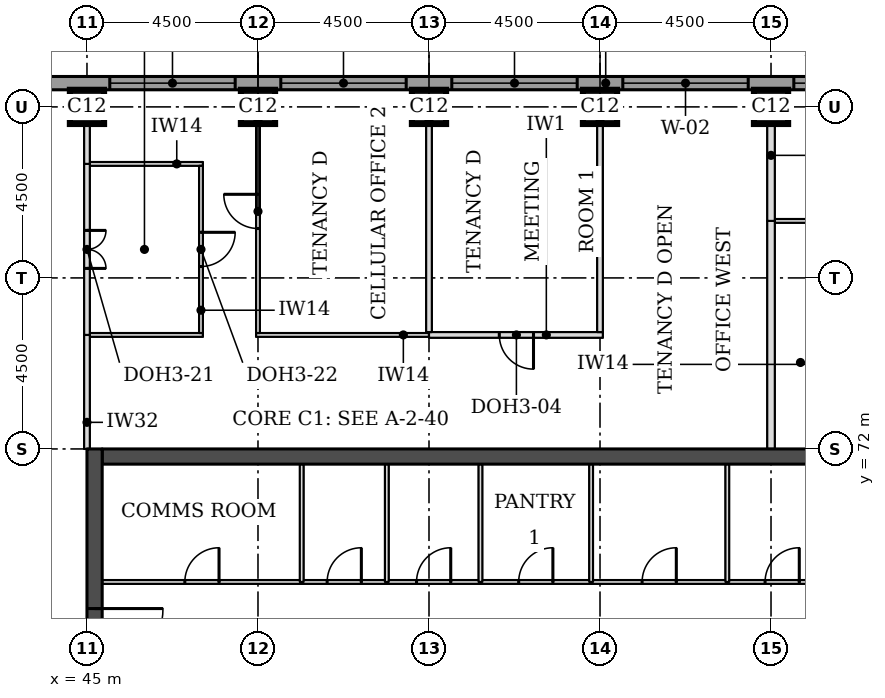
"""IFC4 building model, lengths in metres.
Left out: names, types, materials, properties, quantities, classifications, styles, units other than length and angle.
Written with IfcOpenShell. Run it as: python <this file> out.ifc"""

import sys

from ifc_helpers import new_model, si_unit, direction, frame, frame_2d, origin, origin_2d, place, context, subcontext, project, spatial, rectangle, extrude, element, fill, save


model = new_model("IFC4")
c1 = context("Model", 3, precision=1e-05, world=origin(), true_north=direction((0.0, 1.0)))
c2 = subcontext(c1, "Body", "Model", "MODEL_VIEW")
j1 = project(units=[si_unit("LENGTHUNIT", "METRE"), si_unit("PLANEANGLEUNIT", "RADIAN")], contexts=[c1])
p1 = place(None, origin())
s1 = spatial("IfcSite", under=j1, at=p1, CompositionType="ELEMENT")
p2 = place(p1, origin())
s2 = spatial("IfcBuilding", under=s1, at=p2, CompositionType="ELEMENT")
p3 = place(p2, frame((0.0, 0.0, 162.5)))
s3 = spatial("IfcBuildingStorey", under=s2, at=p3, CompositionType="ELEMENT", Elevation=162.5)
for number, where, z_axis, x_axis in (
    (1, (45.0, 81.0, 0.0), (0.0, 0.0, 1.0), (1.0, 0.0, 0.0)),
    (2, (49.5, 81.0, 0.0), (0.0, 0.0, 1.0), (1.0, 0.0, 0.0)),
    (3, (54.0, 81.0, 0.0), (0.0, 0.0, 1.0), (1.0, 0.0, 0.0)),
    (4, (58.5, 81.0, 0.0), (0.0, 0.0, 1.0), (1.0, 0.0, 0.0)),
    (5, (63.0, 81.0, 0.0), (0.0, 0.0, 1.0), (1.0, 0.0, 0.0)),
):
    element("IfcColumn", number, at=place(p3, frame(where, z_axis=z_axis, x_axis=x_axis)), inside=s3, PredefinedType="COLUMN", context=c2, shape_type="SweptSolid", body=[
        extrude(rectangle(XDim=0.9, YDim=0.9, at=origin_2d()), origin(), (0.0, 0.0, 1.0), 3.7),
    ])
p4 = place(p3, frame((45.4, 71.8, 0.0), z_axis=(0.0, 0.0, 1.0), x_axis=(1.0, 0.0, 0.0)))
e6 = element("IfcWall", 6, at=p4, inside=s3, PredefinedType="SHEAR", context=c2, shape_type="SweptSolid", body=[
    extrude(rectangle(XDim=21.7, YDim=0.4, at=frame_2d((10.85, 0.0))), origin(), (0.0, 0.0, 1.0), 3.7),
])
p5 = place(p3, frame((45.2, 49.5, 0.0), z_axis=(0.0, 0.0, 1.0), x_axis=(0.0, 1.0, 0.0)))
e7 = element("IfcWall", 7, at=p5, inside=s3, PredefinedType="SHEAR", context=c2, shape_type="SweptSolid", body=[
    extrude(rectangle(XDim=22.5, YDim=0.4, at=frame_2d((11.25, 0.0))), origin(), (0.0, 0.0, 1.0), 3.7),
])
p6 = place(p5, frame((4.2, 0.0, 0.0)))
e8 = element("IfcOpeningElement", 8, at=p6, cuts=e7, PredefinedType="OPENING", context=c2, shape_type="SweptSolid", body=[
    extrude(rectangle(XDim=1.8, YDim=2.1, at=frame_2d((0.9, 1.05))), frame((0.0, 0.21, 0.0), z_axis=(0.0, -1.0, 0.0), x_axis=(1.0, 0.0, 0.0)), (0.0, 0.0, 1.0), 0.42),
])
p7 = place(p5, frame((6.9, 0.0, 0.0)))
e9 = element("IfcOpeningElement", 9, at=p7, cuts=e7, PredefinedType="OPENING", context=c2, shape_type="SweptSolid", body=[
    extrude(rectangle(XDim=1.1, YDim=2.1, at=frame_2d((0.55, 1.05))), frame((0.0, 0.21, 0.0), z_axis=(0.0, -1.0, 0.0), x_axis=(1.0, 0.0, 0.0)), (0.0, 0.0, 1.0), 0.42),
])
p8 = place(p5, frame((13.6, 0.0, 0.0)))
e10 = element("IfcOpeningElement", 10, at=p8, cuts=e7, PredefinedType="OPENING", context=c2, shape_type="SweptSolid", body=[
    extrude(rectangle(XDim=1.1, YDim=2.1, at=frame_2d((0.55, 1.05))), frame((0.0, 0.21, 0.0), z_axis=(0.0, -1.0, 0.0), x_axis=(1.0, 0.0, 0.0)), (0.0, 0.0, 1.0), 0.42),
])
p9 = place(p5, frame((16.5, 0.0, 0.0)))
e11 = element("IfcOpeningElement", 11, at=p9, cuts=e7, PredefinedType="OPENING", context=c2, shape_type="SweptSolid", body=[
    extrude(rectangle(XDim=1.8, YDim=2.1, at=frame_2d((0.9, 1.05))), frame((0.0, 0.21, 0.0), z_axis=(0.0, -1.0, 0.0), x_axis=(1.0, 0.0, 0.0)), (0.0, 0.0, 1.0), 0.42),
])
p10 = place(p3, frame((72.331, 81.625, 0.0), z_axis=(0.0, 0.0, 1.0), x_axis=(-1.0, 0.0, 0.0)))
e12 = element("IfcWall", 12, at=p10, inside=s3, PredefinedType="STANDARD", context=c2, shape_type="SweptSolid", body=[
    extrude(rectangle(XDim=32.163, YDim=0.35, at=frame_2d((16.081, 0.0))), origin(), (0.0, 0.0, 1.0), 3.525),
])
p11 = place(p10, frame((5.431, 0.0, 0.9)))
e13 = element("IfcOpeningElement", 13, at=p11, cuts=e12, PredefinedType="OPENING", context=c2, shape_type="SweptSolid", body=[
    extrude(rectangle(XDim=3.3, YDim=1.9, at=frame_2d((1.65, 0.95))), frame((0.0, 0.185, 0.0), z_axis=(0.0, -1.0, 0.0), x_axis=(1.0, 0.0, 0.0)), (0.0, 0.0, 1.0), 0.37),
])
p12 = place(p10, frame((9.931, 0.0, 0.9)))
e14 = element("IfcOpeningElement", 14, at=p12, cuts=e12, PredefinedType="OPENING", context=c2, shape_type="SweptSolid", body=[
    extrude(rectangle(XDim=3.3, YDim=1.9, at=frame_2d((1.65, 0.95))), frame((0.0, 0.185, 0.0), z_axis=(0.0, -1.0, 0.0), x_axis=(1.0, 0.0, 0.0)), (0.0, 0.0, 1.0), 0.37),
])
p13 = place(p10, frame((14.431, 0.0, 0.9)))
e15 = element("IfcOpeningElement", 15, at=p13, cuts=e12, PredefinedType="OPENING", context=c2, shape_type="SweptSolid", body=[
    extrude(rectangle(XDim=3.3, YDim=1.9, at=frame_2d((1.65, 0.95))), frame((0.0, 0.185, 0.0), z_axis=(0.0, -1.0, 0.0), x_axis=(1.0, 0.0, 0.0)), (0.0, 0.0, 1.0), 0.37),
])
p14 = place(p10, frame((18.931, 0.0, 0.9)))
e16 = element("IfcOpeningElement", 16, at=p14, cuts=e12, PredefinedType="OPENING", context=c2, shape_type="SweptSolid", body=[
    extrude(rectangle(XDim=3.3, YDim=1.9, at=frame_2d((1.65, 0.95))), frame((0.0, 0.185, 0.0), z_axis=(0.0, -1.0, 0.0), x_axis=(1.0, 0.0, 0.0)), (0.0, 0.0, 1.0), 0.37),
])
p15 = place(p10, frame((23.431, 0.0, 0.9)))
e17 = element("IfcOpeningElement", 17, at=p15, cuts=e12, PredefinedType="OPENING", context=c2, shape_type="SweptSolid", body=[
    extrude(rectangle(XDim=3.3, YDim=1.9, at=frame_2d((1.65, 0.95))), frame((0.0, 0.185, 0.0), z_axis=(0.0, -1.0, 0.0), x_axis=(1.0, 0.0, 0.0)), (0.0, 0.0, 1.0), 0.37),
])
p16 = place(p3, frame((45.075, 75.0, 0.0), z_axis=(0.0, 0.0, 1.0), x_axis=(1.0, 0.0, 0.0)))
e18 = element("IfcWall", 18, at=p16, inside=s3, PredefinedType="PARTITIONING", context=c2, shape_type="SweptSolid", body=[
    extrude(rectangle(XDim=2.975, YDim=0.1, at=frame_2d((1.488, 0.0))), origin(), (0.0, 0.0, 1.0), 3.55),
])
p17 = place(p3, frame((49.45, 75.0, 0.0), z_axis=(0.0, 0.0, 1.0), x_axis=(1.0, 0.0, 0.0)))
e19 = element("IfcWall", 19, at=p17, inside=s3, PredefinedType="PARTITIONING", context=c2, shape_type="SweptSolid", body=[
    extrude(rectangle(XDim=4.55, YDim=0.1, at=frame_2d((2.275, 0.0))), origin(), (0.0, 0.0, 1.0), 3.55),
])
p18 = place(p3, frame((54.0, 75.0, 0.0), z_axis=(0.0, 0.0, 1.0), x_axis=(1.0, 0.0, 0.0)))
e20 = element("IfcWall", 20, at=p18, inside=s3, PredefinedType="PARTITIONING", context=c2, shape_type="SweptSolid", body=[
    extrude(rectangle(XDim=4.575, YDim=0.15, at=frame_2d((2.288, 0.0))), origin(), (0.0, 0.0, 1.0), 3.55),
])
p19 = place(p18, frame((1.85, 0.0, 0.0)))
e21 = element("IfcOpeningElement", 21, at=p19, cuts=e20, PredefinedType="OPENING", context=c2, shape_type="SweptSolid", body=[
    extrude(rectangle(XDim=0.9, YDim=2.1, at=frame_2d((0.45, 1.05))), frame((0.0, 0.085, 0.0), z_axis=(0.0, -1.0, 0.0), x_axis=(1.0, 0.0, 0.0)), (0.0, 0.0, 1.0), 0.17),
])
p20 = place(p3, frame((63.1, 78.0, 0.0), z_axis=(0.0, 0.0, 1.0), x_axis=(1.0, 0.0, 0.0)))
e22 = element("IfcWall", 22, at=p20, inside=s3, PredefinedType="PARTITIONING", context=c2, shape_type="SweptSolid", body=[
    extrude(rectangle(XDim=4.325, YDim=0.1, at=frame_2d((2.163, 0.0))), origin(), (0.0, 0.0, 1.0), 3.55),
])
p21 = place(p20, frame((1.45, 0.0, 0.0)))
e23 = element("IfcOpeningElement", 23, at=p21, cuts=e22, PredefinedType="OPENING", context=c2, shape_type="SweptSolid", body=[
    extrude(rectangle(XDim=0.9, YDim=2.1, at=frame_2d((0.45, 1.05))), frame((0.0, 0.06, 0.0), z_axis=(0.0, -1.0, 0.0), x_axis=(1.0, 0.0, 0.0)), (0.0, 0.0, 1.0), 0.12),
])
p22 = place(p3, frame((45.075, 79.5, 0.0), z_axis=(0.0, 0.0, 1.0), x_axis=(1.0, 0.0, 0.0)))
e24 = element("IfcWall", 24, at=p22, inside=s3, PredefinedType="PARTITIONING", context=c2, shape_type="SweptSolid", body=[
    extrude(rectangle(XDim=2.975, YDim=0.1, at=frame_2d((1.488, 0.0))), origin(), (0.0, 0.0, 1.0), 3.55),
])
p23 = place(p3, frame((45.0, 72.0, 0.0), z_axis=(0.0, 0.0, 1.0), x_axis=(0.0, 1.0, 0.0)))
e25 = element("IfcWall", 25, at=p23, inside=s3, PredefinedType="PARTITIONING", context=c2, shape_type="SweptSolid", body=[
    extrude(rectangle(XDim=3.0, YDim=0.15, at=frame_2d((1.5, 0.0))), origin(), (0.0, 0.0, 1.0), 3.022),
])
p24 = place(p3, frame((63.0, 72.0, 0.0), z_axis=(0.0, 0.0, 1.0), x_axis=(0.0, 1.0, 0.0)))
e26 = element("IfcWall", 26, at=p24, inside=s3, PredefinedType="PARTITIONING", context=c2, shape_type="SweptSolid", body=[
    extrude(rectangle(XDim=6.0, YDim=0.2, at=frame_2d((3.0, 0.0))), origin(), (0.0, 0.0, 1.0), 3.55),
])
p25 = place(p3, frame((45.0, 75.0, 0.0), z_axis=(0.0, 0.0, 1.0), x_axis=(0.0, 1.0, 0.0)))
e27 = element("IfcWall", 27, at=p25, inside=s3, PredefinedType="PARTITIONING", context=c2, shape_type="SweptSolid", body=[
    extrude(rectangle(XDim=4.5, YDim=0.15, at=frame_2d((2.25, 0.0))), origin(), (0.0, 0.0, 1.0), 3.022),
])
p26 = place(p25, frame((1.75, 0.0, 0.0)))
e28 = element("IfcOpeningElement", 28, at=p26, cuts=e27, PredefinedType="OPENING", context=c2, shape_type="SweptSolid", body=[
    extrude(rectangle(XDim=1.0, YDim=2.1, at=frame_2d((0.5, 1.05))), frame((0.0, 0.085, 0.0), z_axis=(0.0, -1.0, 0.0), x_axis=(1.0, 0.0, 0.0)), (0.0, 0.0, 1.0), 0.17),
])
p27 = place(p3, frame((48.0, 75.05, 0.0), z_axis=(0.0, 0.0, 1.0), x_axis=(0.0, 1.0, 0.0)))
e29 = element("IfcWall", 29, at=p27, inside=s3, PredefinedType="PARTITIONING", context=c2, shape_type="SweptSolid", body=[
    extrude(rectangle(XDim=4.4, YDim=0.1, at=frame_2d((2.2, 0.0))), origin(), (0.0, 0.0, 1.0), 3.55),
])
p28 = place(p27, frame((1.75, 0.0, 0.0)))
e30 = element("IfcOpeningElement", 30, at=p28, cuts=e29, PredefinedType="OPENING", context=c2, shape_type="SweptSolid", body=[
    extrude(rectangle(XDim=0.9, YDim=2.1, at=frame_2d((0.45, 1.05))), frame((0.0, 0.06, 0.0), z_axis=(0.0, -1.0, 0.0), x_axis=(1.0, 0.0, 0.0)), (0.0, 0.0, 1.0), 0.12),
])
p29 = place(p3, frame((49.5, 75.05, 0.0), z_axis=(0.0, 0.0, 1.0), x_axis=(0.0, 1.0, 0.0)))
e31 = element("IfcWall", 31, at=p29, inside=s3, PredefinedType="PARTITIONING", context=c2, shape_type="SweptSolid", body=[
    extrude(rectangle(XDim=6.4, YDim=0.1, at=frame_2d((3.2, 0.0))), origin(), (0.0, 0.0, 1.0), 3.55),
])
p30 = place(p29, frame((2.75, 0.0, 0.0)))
e32 = element("IfcOpeningElement", 32, at=p30, cuts=e31, PredefinedType="OPENING", context=c2, shape_type="SweptSolid", body=[
    extrude(rectangle(XDim=0.9, YDim=2.1, at=frame_2d((0.45, 1.05))), frame((0.0, 0.06, 0.0), z_axis=(0.0, -1.0, 0.0), x_axis=(1.0, 0.0, 0.0)), (0.0, 0.0, 1.0), 0.12),
])
for number, where, z_axis, x_axis in (
    (33, (54.0, 75.075, 0.0), (0.0, 0.0, 1.0), (0.0, 1.0, 0.0)),
    (34, (58.5, 75.075, 0.0), (0.0, 0.0, 1.0), (0.0, 1.0, 0.0)),
):
    element("IfcWall", number, at=place(p3, frame(where, z_axis=z_axis, x_axis=x_axis)), inside=s3, PredefinedType="PARTITIONING", context=c2, shape_type="SweptSolid", body=[
        extrude(rectangle(XDim=6.375, YDim=0.15, at=frame_2d((3.188, 0.0))), origin(), (0.0, 0.0, 1.0), 3.55),
    ])
p31 = place(p3, frame((63.0, 78.0, 0.0), z_axis=(0.0, 0.0, 1.0), x_axis=(0.0, 1.0, 0.0)))
e35 = element("IfcWall", 35, at=p31, inside=s3, PredefinedType="PARTITIONING", context=c2, shape_type="SweptSolid", body=[
    extrude(rectangle(XDim=3.45, YDim=0.2, at=frame_2d((1.725, 0.0))), origin(), (0.0, 0.0, 1.0), 3.55),
])
p32 = place(p3, frame((45.0, 79.5, 0.0), z_axis=(0.0, 0.0, 1.0), x_axis=(0.0, 1.0, 0.0)))
e36 = element("IfcWall", 36, at=p32, inside=s3, PredefinedType="PARTITIONING", context=c2, shape_type="SweptSolid", body=[
    extrude(rectangle(XDim=1.95, YDim=0.15, at=frame_2d((0.975, 0.0))), origin(), (0.0, 0.0, 1.0), 3.022),
])
p33 = place(p3, frame((45.4, 68.5, 0.0), z_axis=(0.0, 0.0, 1.0), x_axis=(1.0, 0.0, 0.0)))
e37 = element("IfcWall", 37, at=p33, inside=s3, PredefinedType="PARTITIONING", context=c2, shape_type="SweptSolid", body=[
    extrude(rectangle(XDim=21.7, YDim=0.1, at=frame_2d((10.85, 0.0))), origin(), (0.0, 0.0, 1.0), 3.55),
])
p34 = place(p33, frame((20.069, 0.0, 0.0)))
e38 = element("IfcOpeningElement", 38, at=p34, cuts=e37, PredefinedType="OPENING", context=c2, shape_type="SweptSolid", body=[
    extrude(rectangle(XDim=0.9, YDim=2.1, at=frame_2d((0.45, 1.05))), frame((0.0, 0.06, 0.0), z_axis=(0.0, -1.0, 0.0), x_axis=(1.0, 0.0, 0.0)), (0.0, 0.0, 1.0), 0.12),
])
p35 = place(p33, frame((17.444, 0.0, 0.0)))
e39 = element("IfcOpeningElement", 39, at=p35, cuts=e37, PredefinedType="OPENING", context=c2, shape_type="SweptSolid", body=[
    extrude(rectangle(XDim=0.9, YDim=2.1, at=frame_2d((0.45, 1.05))), frame((0.0, 0.06, 0.0), z_axis=(0.0, -1.0, 0.0), x_axis=(1.0, 0.0, 0.0)), (0.0, 0.0, 1.0), 0.12),
])
p36 = place(p33, frame((2.175, 0.0, 0.0)))
e40 = element("IfcOpeningElement", 40, at=p36, cuts=e37, PredefinedType="OPENING", context=c2, shape_type="SweptSolid", body=[
    extrude(rectangle(XDim=0.9, YDim=2.1, at=frame_2d((0.45, 1.05))), frame((0.0, 0.06, 0.0), z_axis=(0.0, -1.0, 0.0), x_axis=(1.0, 0.0, 0.0)), (0.0, 0.0, 1.0), 0.12),
])
p37 = place(p33, frame((14.208, 0.0, 0.0)))
e41 = element("IfcOpeningElement", 41, at=p37, cuts=e37, PredefinedType="OPENING", context=c2, shape_type="SweptSolid", body=[
    extrude(rectangle(XDim=0.9, YDim=2.1, at=frame_2d((0.45, 1.05))), frame((0.0, 0.06, 0.0), z_axis=(0.0, -1.0, 0.0), x_axis=(1.0, 0.0, 0.0)), (0.0, 0.0, 1.0), 0.12),
])
p38 = place(p33, frame((10.96, 0.0, 0.0)))
e42 = element("IfcOpeningElement", 42, at=p38, cuts=e37, PredefinedType="OPENING", context=c2, shape_type="SweptSolid", body=[
    extrude(rectangle(XDim=0.9, YDim=2.1, at=frame_2d((0.45, 1.05))), frame((0.0, 0.06, 0.0), z_axis=(0.0, -1.0, 0.0), x_axis=(1.0, 0.0, 0.0)), (0.0, 0.0, 1.0), 0.12),
])
p39 = place(p33, frame((8.272, 0.0, 0.0)))
e43 = element("IfcOpeningElement", 43, at=p39, cuts=e37, PredefinedType="OPENING", context=c2, shape_type="SweptSolid", body=[
    extrude(rectangle(XDim=0.9, YDim=2.1, at=frame_2d((0.45, 1.05))), frame((0.0, 0.06, 0.0), z_axis=(0.0, -1.0, 0.0), x_axis=(1.0, 0.0, 0.0)), (0.0, 0.0, 1.0), 0.12),
])
p40 = place(p33, frame((5.92, 0.0, 0.0)))
e44 = element("IfcOpeningElement", 44, at=p40, cuts=e37, PredefinedType="OPENING", context=c2, shape_type="SweptSolid", body=[
    extrude(rectangle(XDim=0.9, YDim=2.1, at=frame_2d((0.45, 1.05))), frame((0.0, 0.06, 0.0), z_axis=(0.0, -1.0, 0.0), x_axis=(1.0, 0.0, 0.0)), (0.0, 0.0, 1.0), 0.12),
])
for number, where, z_axis, x_axis in (
    (45, (50.65, 68.5, 0.0), (0.0, 0.0, 1.0), (0.0, 1.0, 0.0)),
    (46, (52.89, 68.5, 0.0), (0.0, 0.0, 1.0), (0.0, 1.0, 0.0)),
    (47, (55.354, 68.5, 0.0), (0.0, 0.0, 1.0), (0.0, 1.0, 0.0)),
    (48, (58.266, 68.5, 0.0), (0.0, 0.0, 1.0), (0.0, 1.0, 0.0)),
    (49, (61.85, 68.5, 0.0), (0.0, 0.0, 1.0), (0.0, 1.0, 0.0)),
):
    element("IfcWall", number, at=place(p3, frame(where, z_axis=z_axis, x_axis=x_axis)), inside=s3, PredefinedType="PARTITIONING", context=c2, shape_type="SweptSolid", body=[
        extrude(rectangle(XDim=3.1, YDim=0.1, at=frame_2d((1.55, 0.0))), origin(), (0.0, 0.0, 1.0), 3.55),
    ])
p41 = place(p11, origin())
e50 = element("IfcWindow", 50, at=p41, inside=s3, PartitioningType="SINGLE_PANEL", PredefinedType="WINDOW", context=c2, shape_type="SweptSolid", body=[
    extrude(rectangle(XDim=3.3, YDim=1.9, at=frame_2d((1.65, 0.95))), frame((0.0, 0.085, 0.0), z_axis=(0.0, -1.0, 0.0), x_axis=(1.0, 0.0, 0.0)), (0.0, 0.0, 1.0), 0.06),
])
fill(e13, e50)
p42 = place(p12, origin())
e51 = element("IfcWindow", 51, at=p42, inside=s3, PartitioningType="SINGLE_PANEL", PredefinedType="WINDOW", context=c2, shape_type="SweptSolid", body=[
    extrude(rectangle(XDim=3.3, YDim=1.9, at=frame_2d((1.65, 0.95))), frame((0.0, 0.085, 0.0), z_axis=(0.0, -1.0, 0.0), x_axis=(1.0, 0.0, 0.0)), (0.0, 0.0, 1.0), 0.06),
])
fill(e14, e51)
p43 = place(p13, origin())
e52 = element("IfcWindow", 52, at=p43, inside=s3, PartitioningType="SINGLE_PANEL", PredefinedType="WINDOW", context=c2, shape_type="SweptSolid", body=[
    extrude(rectangle(XDim=3.3, YDim=1.9, at=frame_2d((1.65, 0.95))), frame((0.0, 0.085, 0.0), z_axis=(0.0, -1.0, 0.0), x_axis=(1.0, 0.0, 0.0)), (0.0, 0.0, 1.0), 0.06),
])
fill(e15, e52)
p44 = place(p14, origin())
e53 = element("IfcWindow", 53, at=p44, inside=s3, PartitioningType="SINGLE_PANEL", PredefinedType="WINDOW", context=c2, shape_type="SweptSolid", body=[
    extrude(rectangle(XDim=3.3, YDim=1.9, at=frame_2d((1.65, 0.95))), frame((0.0, 0.085, 0.0), z_axis=(0.0, -1.0, 0.0), x_axis=(1.0, 0.0, 0.0)), (0.0, 0.0, 1.0), 0.06),
])
fill(e16, e53)
p45 = place(p15, origin())
e54 = element("IfcWindow", 54, at=p45, inside=s3, PartitioningType="SINGLE_PANEL", PredefinedType="WINDOW", context=c2, shape_type="SweptSolid", body=[
    extrude(rectangle(XDim=3.3, YDim=1.9, at=frame_2d((1.65, 0.95))), frame((0.0, 0.085, 0.0), z_axis=(0.0, -1.0, 0.0), x_axis=(1.0, 0.0, 0.0)), (0.0, 0.0, 1.0), 0.06),
])
fill(e17, e54)
p46 = place(p26, frame((1.0, 0.0, 0.0), z_axis=(0.0, 0.0, 1.0), x_axis=(-1.0, 0.0, 0.0)))
e55 = element("IfcDoor", 55, at=p46, inside=s3, OperationType="DOUBLE_DOOR_SINGLE_SWING", PredefinedType="DOOR", context=c2, shape_type="SweptSolid", body=[
    extrude(rectangle(XDim=1.0, YDim=2.1, at=frame_2d((0.5, 1.05))), frame((0.0, 0.025, 0.0), z_axis=(0.0, -1.0, 0.0), x_axis=(1.0, 0.0, 0.0)), (0.0, 0.0, 1.0), 0.05),
])
fill(e28, e55)
p47 = place(p28, frame((0.9, 0.0, 0.0), z_axis=(0.0, 0.0, 1.0), x_axis=(-1.0, 0.0, 0.0)))
e56 = element("IfcDoor", 56, at=p47, inside=s3, OperationType="SINGLE_SWING_LEFT", PredefinedType="DOOR", context=c2, shape_type="SweptSolid", body=[
    extrude(rectangle(XDim=0.9, YDim=2.1, at=frame_2d((0.45, 1.05))), frame((0.0, 0.025, 0.0), z_axis=(0.0, -1.0, 0.0), x_axis=(1.0, 0.0, 0.0)), (0.0, 0.0, 1.0), 0.05),
])
fill(e30, e56)
p48 = place(p30, origin())
e57 = element("IfcDoor", 57, at=p48, inside=s3, OperationType="SINGLE_SWING_RIGHT", PredefinedType="DOOR", context=c2, shape_type="SweptSolid", body=[
    extrude(rectangle(XDim=0.9, YDim=2.1, at=frame_2d((0.45, 1.05))), frame((0.0, 0.025, 0.0), z_axis=(0.0, -1.0, 0.0), x_axis=(1.0, 0.0, 0.0)), (0.0, 0.0, 1.0), 0.05),
])
fill(e32, e57)
p49 = place(p19, frame((0.9, 0.0, 0.0), z_axis=(0.0, 0.0, 1.0), x_axis=(-1.0, 0.0, 0.0)))
e58 = element("IfcDoor", 58, at=p49, inside=s3, OperationType="SINGLE_SWING_LEFT", PredefinedType="DOOR", context=c2, shape_type="SweptSolid", body=[
    extrude(rectangle(XDim=0.9, YDim=2.1, at=frame_2d((0.45, 1.05))), frame((0.0, 0.025, 0.0), z_axis=(0.0, -1.0, 0.0), x_axis=(1.0, 0.0, 0.0)), (0.0, 0.0, 1.0), 0.05),
])
fill(e21, e58)
p50 = place(p9, frame((1.8, 0.0, 0.0), z_axis=(0.0, 0.0, 1.0), x_axis=(-1.0, 0.0, 0.0)))
e59 = element("IfcDoor", 59, at=p50, inside=s3, OperationType="SINGLE_SWING_LEFT", PredefinedType="DOOR", context=c2, shape_type="SweptSolid", body=[
    extrude(rectangle(XDim=1.8, YDim=2.1, at=frame_2d((0.9, 1.05))), frame((0.0, 0.025, 0.0), z_axis=(0.0, -1.0, 0.0), x_axis=(1.0, 0.0, 0.0)), (0.0, 0.0, 1.0), 0.05),
])
fill(e11, e59)
p51 = place(p35, origin())
e60 = element("IfcDoor", 60, at=p51, inside=s3, OperationType="SINGLE_SWING_RIGHT", PredefinedType="DOOR", context=c2, shape_type="SweptSolid", body=[
    extrude(rectangle(XDim=0.9, YDim=2.1, at=frame_2d((0.45, 1.05))), frame((0.0, 0.025, 0.0), z_axis=(0.0, -1.0, 0.0), x_axis=(1.0, 0.0, 0.0)), (0.0, 0.0, 1.0), 0.05),
])
fill(e39, e60)
p52 = place(p36, origin())
e61 = element("IfcDoor", 61, at=p52, inside=s3, OperationType="SINGLE_SWING_RIGHT", PredefinedType="DOOR", context=c2, shape_type="SweptSolid", body=[
    extrude(rectangle(XDim=0.9, YDim=2.1, at=frame_2d((0.45, 1.05))), frame((0.0, 0.025, 0.0), z_axis=(0.0, -1.0, 0.0), x_axis=(1.0, 0.0, 0.0)), (0.0, 0.0, 1.0), 0.05),
])
fill(e40, e61)
p53 = place(p37, origin())
e62 = element("IfcDoor", 62, at=p53, inside=s3, OperationType="SINGLE_SWING_RIGHT", PredefinedType="DOOR", context=c2, shape_type="SweptSolid", body=[
    extrude(rectangle(XDim=0.9, YDim=2.1, at=frame_2d((0.45, 1.05))), frame((0.0, 0.025, 0.0), z_axis=(0.0, -1.0, 0.0), x_axis=(1.0, 0.0, 0.0)), (0.0, 0.0, 1.0), 0.05),
])
fill(e41, e62)
p54 = place(p38, origin())
e63 = element("IfcDoor", 63, at=p54, inside=s3, OperationType="SINGLE_SWING_RIGHT", PredefinedType="DOOR", context=c2, shape_type="SweptSolid", body=[
    extrude(rectangle(XDim=0.9, YDim=2.1, at=frame_2d((0.45, 1.05))), frame((0.0, 0.025, 0.0), z_axis=(0.0, -1.0, 0.0), x_axis=(1.0, 0.0, 0.0)), (0.0, 0.0, 1.0), 0.05),
])
fill(e42, e63)
p55 = place(p39, origin())
e64 = element("IfcDoor", 64, at=p55, inside=s3, OperationType="SINGLE_SWING_RIGHT", PredefinedType="DOOR", context=c2, shape_type="SweptSolid", body=[
    extrude(rectangle(XDim=0.9, YDim=2.1, at=frame_2d((0.45, 1.05))), frame((0.0, 0.025, 0.0), z_axis=(0.0, -1.0, 0.0), x_axis=(1.0, 0.0, 0.0)), (0.0, 0.0, 1.0), 0.05),
])
fill(e43, e64)
p56 = place(p40, origin())
e65 = element("IfcDoor", 65, at=p56, inside=s3, OperationType="SINGLE_SWING_RIGHT", PredefinedType="DOOR", context=c2, shape_type="SweptSolid", body=[
    extrude(rectangle(XDim=0.9, YDim=2.1, at=frame_2d((0.45, 1.05))), frame((0.0, 0.025, 0.0), z_axis=(0.0, -1.0, 0.0), x_axis=(1.0, 0.0, 0.0)), (0.0, 0.0, 1.0), 0.05),
])
fill(e44, e65)
save(model, sys.argv[1])
